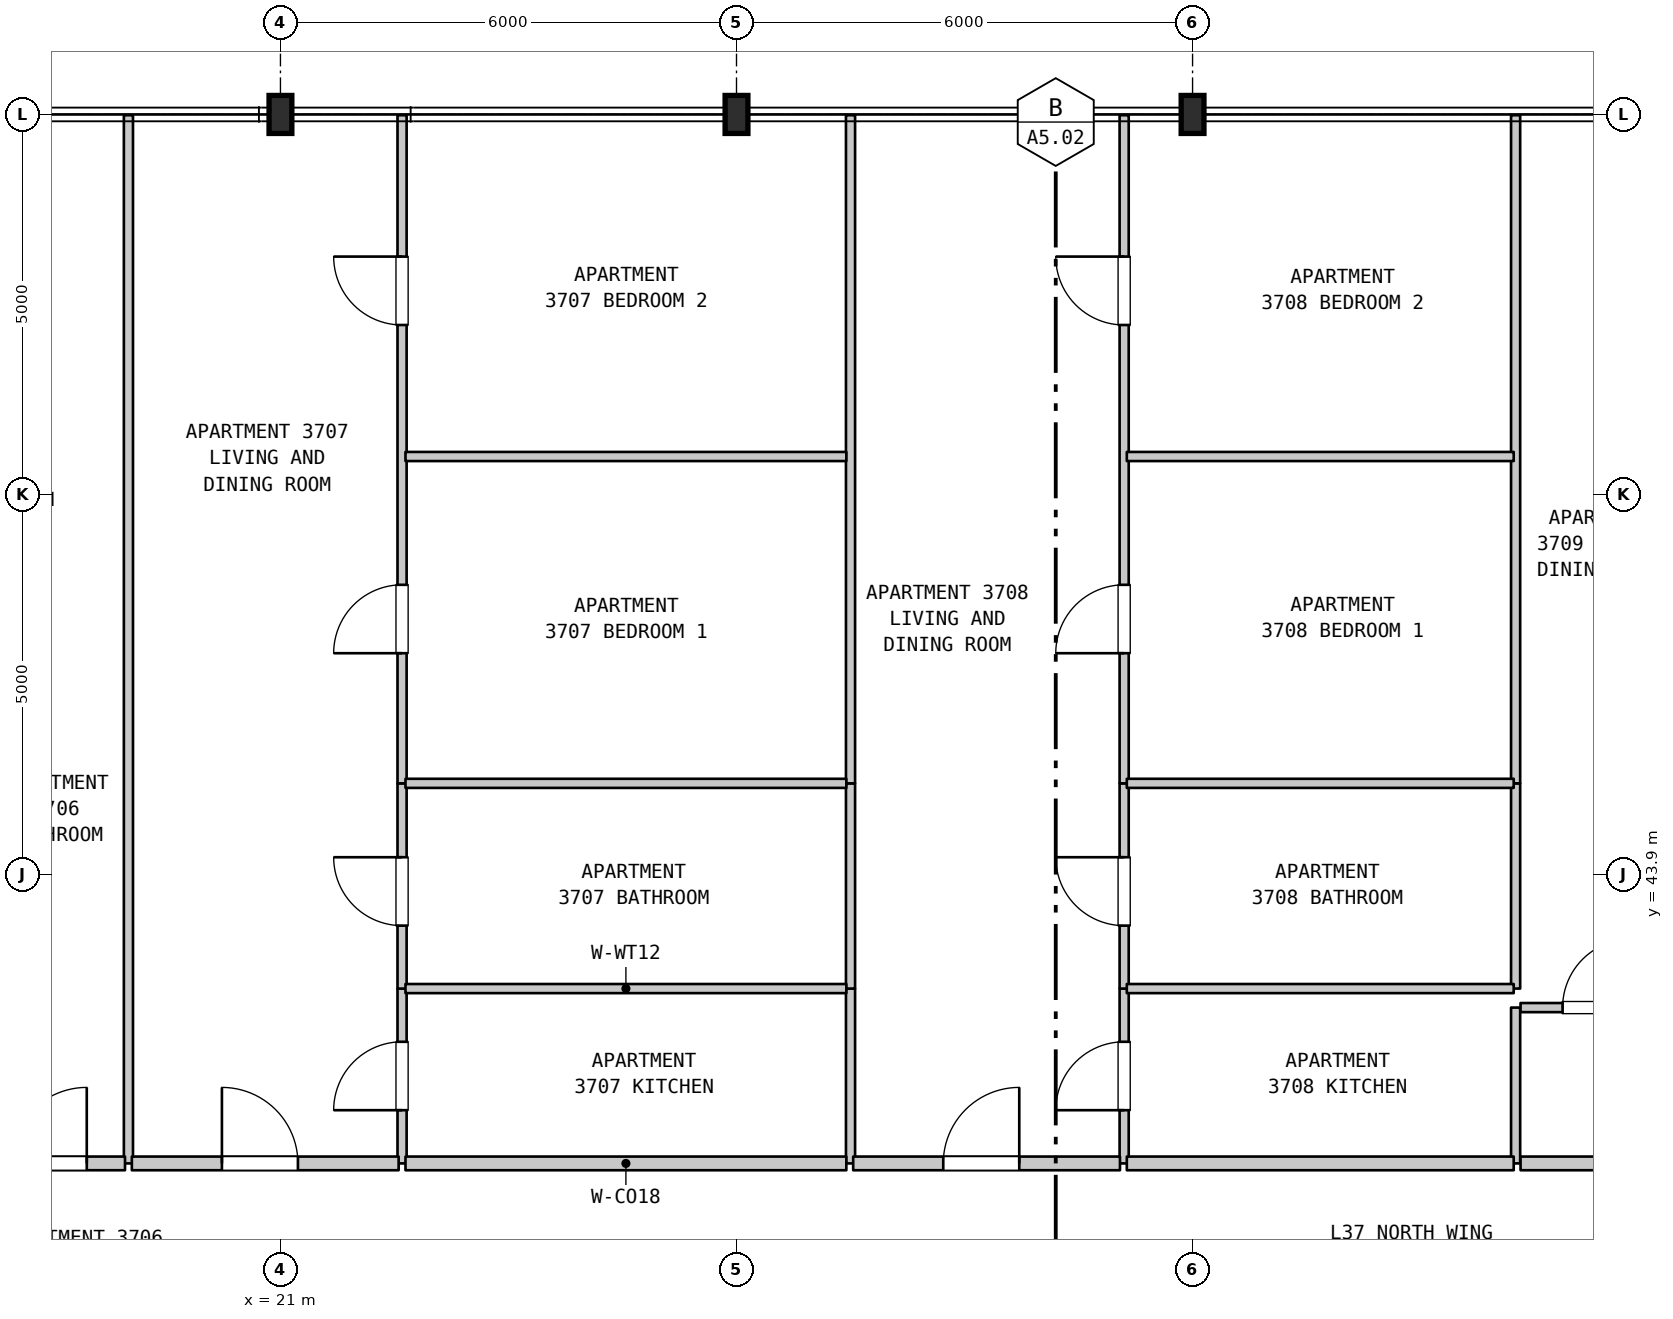
"""IFC4 building model, lengths in metres.
Left out: names, types, materials, properties, quantities, classifications, styles, units other than length and angle.
Written with IfcOpenShell. Run it as: python <this file> out.ifc"""

import sys

from ifc_helpers import new_model, si_unit, direction, frame, frame_2d, origin, origin_2d, place, context, subcontext, project, spatial, rectangle, i_section, extrude, element, fill, save


model = new_model("IFC4")
c1 = context("Model", 3, precision=1e-05, world=origin(), true_north=direction((0.0, 1.0)))
c2 = subcontext(c1, "Body", "Model", "MODEL_VIEW")
j1 = project(units=[si_unit("LENGTHUNIT", "METRE"), si_unit("PLANEANGLEUNIT", "RADIAN")], contexts=[c1])
p1 = place(None, origin())
s1 = spatial("IfcSite", under=j1, at=p1, CompositionType="ELEMENT")
p2 = place(p1, origin())
s2 = spatial("IfcBuilding", under=s1, at=p2, CompositionType="ELEMENT")
p3 = place(p2, frame((0.0, 0.0, 152.0)))
s3 = spatial("IfcBuildingStorey", under=s2, at=p3, CompositionType="ELEMENT", Elevation=152.0)
for number, where, z_axis, x_axis in (
    (1, (21.0, 53.9, 0.0), (0.0, 0.0, 1.0), (1.0, 0.0, 0.0)),
    (2, (27.0, 53.9, 0.0), (0.0, 0.0, 1.0), (1.0, 0.0, 0.0)),
    (3, (33.0, 53.9, 0.0), (0.0, 0.0, 1.0), (1.0, 0.0, 0.0)),
):
    element("IfcColumn", number, at=place(p3, frame(where, z_axis=z_axis, x_axis=x_axis)), inside=s3, PredefinedType="COLUMN", context=c2, shape_type="SweptSolid", body=[
        extrude(i_section(OverallWidth=0.3, OverallDepth=0.5, WebThickness=0.014, FlangeThickness=0.028, FilletRadius=0.027, at=origin_2d()), origin(), (0.0, 0.0, 1.0), 3.7),
    ])
p4 = place(p3, frame((19.0, 40.1, 0.0), z_axis=(0.0, 0.0, 1.0), x_axis=(0.0, 1.0, 0.0)))
e4 = element("IfcWall", 4, at=p4, inside=s3, PredefinedType="PARTITIONING", context=c2, shape_type="SweptSolid", body=[
    extrude(rectangle(XDim=13.79, YDim=0.12, at=frame_2d((6.895, 0.0))), origin(), (0.0, 0.0, 1.0), 3.385),
])
p5 = place(p3, frame((22.6, 40.1, 0.0), z_axis=(0.0, 0.0, 1.0), x_axis=(0.0, 1.0, 0.0)))
e5 = element("IfcWall", 5, at=p5, inside=s3, PredefinedType="PARTITIONING", context=c2, shape_type="SweptSolid", body=[
    extrude(rectangle(XDim=2.3, YDim=0.12, at=frame_2d((1.15, 0.0))), origin(), (0.0, 0.0, 1.0), 3.385),
])
p6 = place(p5, frame((0.7, 0.0, 0.0)))
e6 = element("IfcOpeningElement", 6, at=p6, cuts=e5, PredefinedType="OPENING", context=c2, shape_type="SweptSolid", body=[
    extrude(rectangle(XDim=0.9, YDim=2.15, at=frame_2d((0.45, 1.075))), frame((0.0, 0.07, 0.0), z_axis=(0.0, -1.0, 0.0), x_axis=(1.0, 0.0, 0.0)), (0.0, 0.0, 1.0), 0.14),
])
p7 = place(p3, frame((22.6, 42.4, 0.0), z_axis=(0.0, 0.0, 1.0), x_axis=(0.0, 1.0, 0.0)))
e7 = element("IfcWall", 7, at=p7, inside=s3, PredefinedType="PARTITIONING", context=c2, shape_type="SweptSolid", body=[
    extrude(rectangle(XDim=2.7, YDim=0.12, at=frame_2d((1.35, 0.0))), origin(), (0.0, 0.0, 1.0), 3.385),
])
p8 = place(p7, frame((0.828, 0.0, 0.0)))
e8 = element("IfcOpeningElement", 8, at=p8, cuts=e7, PredefinedType="OPENING", context=c2, shape_type="SweptSolid", body=[
    extrude(rectangle(XDim=0.9, YDim=2.1, at=frame_2d((0.45, 1.05))), frame((0.0, 0.07, 0.0), z_axis=(0.0, -1.0, 0.0), x_axis=(1.0, 0.0, 0.0)), (0.0, 0.0, 1.0), 0.14),
])
p9 = place(p3, frame((22.6, 45.1, 0.0), z_axis=(0.0, 0.0, 1.0), x_axis=(0.0, 1.0, 0.0)))
e9 = element("IfcWall", 9, at=p9, inside=s3, PredefinedType="PARTITIONING", context=c2, shape_type="SweptSolid", body=[
    extrude(rectangle(XDim=8.79, YDim=0.12, at=frame_2d((4.395, 0.0))), origin(), (0.0, 0.0, 1.0), 3.385),
])
p10 = place(p9, frame((1.712, 0.0, 0.0)))
e10 = element("IfcOpeningElement", 10, at=p10, cuts=e9, PredefinedType="OPENING", context=c2, shape_type="SweptSolid", body=[
    extrude(rectangle(XDim=0.9, YDim=2.15, at=frame_2d((0.45, 1.075))), frame((0.0, 0.07, 0.0), z_axis=(0.0, -1.0, 0.0), x_axis=(1.0, 0.0, 0.0)), (0.0, 0.0, 1.0), 0.14),
])
p11 = place(p9, frame((6.03, 0.0, 0.0)))
e11 = element("IfcOpeningElement", 11, at=p11, cuts=e9, PredefinedType="OPENING", context=c2, shape_type="SweptSolid", body=[
    extrude(rectangle(XDim=0.9, YDim=2.15, at=frame_2d((0.45, 1.075))), frame((0.0, 0.07, 0.0), z_axis=(0.0, -1.0, 0.0), x_axis=(1.0, 0.0, 0.0)), (0.0, 0.0, 1.0), 0.14),
])
p12 = place(p3, frame((28.5, 40.1, 0.0), z_axis=(0.0, 0.0, 1.0), x_axis=(0.0, 1.0, 0.0)))
e12 = element("IfcWall", 12, at=p12, inside=s3, PredefinedType="PARTITIONING", context=c2, shape_type="SweptSolid", body=[
    extrude(rectangle(XDim=2.3, YDim=0.12, at=frame_2d((1.15, 0.0))), origin(), (0.0, 0.0, 1.0), 3.385),
])
p13 = place(p3, frame((28.5, 42.4, 0.0), z_axis=(0.0, 0.0, 1.0), x_axis=(0.0, 1.0, 0.0)))
e13 = element("IfcWall", 13, at=p13, inside=s3, PredefinedType="PARTITIONING", context=c2, shape_type="SweptSolid", body=[
    extrude(rectangle(XDim=2.7, YDim=0.12, at=frame_2d((1.35, 0.0))), origin(), (0.0, 0.0, 1.0), 3.385),
])
p14 = place(p3, frame((28.5, 45.1, 0.0), z_axis=(0.0, 0.0, 1.0), x_axis=(0.0, 1.0, 0.0)))
e14 = element("IfcWall", 14, at=p14, inside=s3, PredefinedType="PARTITIONING", context=c2, shape_type="SweptSolid", body=[
    extrude(rectangle(XDim=8.79, YDim=0.12, at=frame_2d((4.395, 0.0))), origin(), (0.0, 0.0, 1.0), 3.385),
])
p15 = place(p3, frame((32.1, 40.1, 0.0), z_axis=(0.0, 0.0, 1.0), x_axis=(0.0, 1.0, 0.0)))
e15 = element("IfcWall", 15, at=p15, inside=s3, PredefinedType="PARTITIONING", context=c2, shape_type="SweptSolid", body=[
    extrude(rectangle(XDim=2.3, YDim=0.12, at=frame_2d((1.15, 0.0))), origin(), (0.0, 0.0, 1.0), 3.385),
])
p16 = place(p15, frame((0.7, 0.0, 0.0)))
e16 = element("IfcOpeningElement", 16, at=p16, cuts=e15, PredefinedType="OPENING", context=c2, shape_type="SweptSolid", body=[
    extrude(rectangle(XDim=0.9, YDim=2.15, at=frame_2d((0.45, 1.075))), frame((0.0, 0.07, 0.0), z_axis=(0.0, -1.0, 0.0), x_axis=(1.0, 0.0, 0.0)), (0.0, 0.0, 1.0), 0.14),
])
p17 = place(p3, frame((32.1, 42.4, 0.0), z_axis=(0.0, 0.0, 1.0), x_axis=(0.0, 1.0, 0.0)))
e17 = element("IfcWall", 17, at=p17, inside=s3, PredefinedType="PARTITIONING", context=c2, shape_type="SweptSolid", body=[
    extrude(rectangle(XDim=2.7, YDim=0.12, at=frame_2d((1.35, 0.0))), origin(), (0.0, 0.0, 1.0), 3.385),
])
p18 = place(p17, frame((0.828, 0.0, 0.0)))
e18 = element("IfcOpeningElement", 18, at=p18, cuts=e17, PredefinedType="OPENING", context=c2, shape_type="SweptSolid", body=[
    extrude(rectangle(XDim=0.9, YDim=2.1, at=frame_2d((0.45, 1.05))), frame((0.0, 0.07, 0.0), z_axis=(0.0, -1.0, 0.0), x_axis=(1.0, 0.0, 0.0)), (0.0, 0.0, 1.0), 0.14),
])
p19 = place(p3, frame((32.1, 45.1, 0.0), z_axis=(0.0, 0.0, 1.0), x_axis=(0.0, 1.0, 0.0)))
e19 = element("IfcWall", 19, at=p19, inside=s3, PredefinedType="PARTITIONING", context=c2, shape_type="SweptSolid", body=[
    extrude(rectangle(XDim=8.79, YDim=0.12, at=frame_2d((4.395, 0.0))), origin(), (0.0, 0.0, 1.0), 3.385),
])
p20 = place(p19, frame((1.712, 0.0, 0.0)))
e20 = element("IfcOpeningElement", 20, at=p20, cuts=e19, PredefinedType="OPENING", context=c2, shape_type="SweptSolid", body=[
    extrude(rectangle(XDim=0.9, YDim=2.15, at=frame_2d((0.45, 1.075))), frame((0.0, 0.07, 0.0), z_axis=(0.0, -1.0, 0.0), x_axis=(1.0, 0.0, 0.0)), (0.0, 0.0, 1.0), 0.14),
])
p21 = place(p19, frame((6.03, 0.0, 0.0)))
e21 = element("IfcOpeningElement", 21, at=p21, cuts=e19, PredefinedType="OPENING", context=c2, shape_type="SweptSolid", body=[
    extrude(rectangle(XDim=0.9, YDim=2.15, at=frame_2d((0.45, 1.075))), frame((0.0, 0.07, 0.0), z_axis=(0.0, -1.0, 0.0), x_axis=(1.0, 0.0, 0.0)), (0.0, 0.0, 1.0), 0.14),
])
p22 = place(p3, frame((37.25, 40.1, 0.0), z_axis=(0.0, 0.0, 1.0), x_axis=(0.0, 1.0, 0.0)))
e22 = element("IfcWall", 22, at=p22, inside=s3, PredefinedType="PARTITIONING", context=c2, shape_type="SweptSolid", body=[
    extrude(rectangle(XDim=2.05, YDim=0.12, at=frame_2d((1.025, 0.0))), origin(), (0.0, 0.0, 1.0), 3.385),
])
p23 = place(p3, frame((37.25, 42.4, 0.0), z_axis=(0.0, 0.0, 1.0), x_axis=(0.0, 1.0, 0.0)))
e23 = element("IfcWall", 23, at=p23, inside=s3, PredefinedType="PARTITIONING", context=c2, shape_type="SweptSolid", body=[
    extrude(rectangle(XDim=2.7, YDim=0.12, at=frame_2d((1.35, 0.0))), origin(), (0.0, 0.0, 1.0), 3.385),
])
p24 = place(p3, frame((37.25, 45.1, 0.0), z_axis=(0.0, 0.0, 1.0), x_axis=(0.0, 1.0, 0.0)))
e24 = element("IfcWall", 24, at=p24, inside=s3, PredefinedType="PARTITIONING", context=c2, shape_type="SweptSolid", body=[
    extrude(rectangle(XDim=8.79, YDim=0.12, at=frame_2d((4.395, 0.0))), origin(), (0.0, 0.0, 1.0), 3.385),
])
p25 = place(p3, frame((17.095, 40.1, 0.0), z_axis=(0.0, 0.0, 1.0), x_axis=(1.0, 0.0, 0.0)))
e25 = element("IfcWall", 25, at=p25, inside=s3, PredefinedType="STANDARD", context=c2, shape_type="SweptSolid", body=[
    extrude(rectangle(XDim=1.86, YDim=0.18, at=frame_2d((0.93, 0.0))), origin(), (0.0, 0.0, 1.0), 3.385),
])
p26 = place(p25, frame((0.357, 0.0, 0.0)))
e26 = element("IfcOpeningElement", 26, at=p26, cuts=e25, PredefinedType="OPENING", context=c2, shape_type="SweptSolid", body=[
    extrude(rectangle(XDim=1.0, YDim=2.15, at=frame_2d((0.5, 1.075))), frame((0.0, 0.1, 0.0), z_axis=(0.0, -1.0, 0.0), x_axis=(1.0, 0.0, 0.0)), (0.0, 0.0, 1.0), 0.2),
])
p27 = place(p3, frame((19.045, 40.1, 0.0), z_axis=(0.0, 0.0, 1.0), x_axis=(1.0, 0.0, 0.0)))
e27 = element("IfcWall", 27, at=p27, inside=s3, PredefinedType="STANDARD", context=c2, shape_type="SweptSolid", body=[
    extrude(rectangle(XDim=3.51, YDim=0.18, at=frame_2d((1.755, 0.0))), origin(), (0.0, 0.0, 1.0), 3.385),
])
p28 = place(p27, frame((1.185, 0.0, 0.0)))
e28 = element("IfcOpeningElement", 28, at=p28, cuts=e27, PredefinedType="OPENING", context=c2, shape_type="SweptSolid", body=[
    extrude(rectangle(XDim=1.0, YDim=2.15, at=frame_2d((0.5, 1.075))), frame((0.0, 0.1, 0.0), z_axis=(0.0, -1.0, 0.0), x_axis=(1.0, 0.0, 0.0)), (0.0, 0.0, 1.0), 0.2),
])
p29 = place(p3, frame((22.645, 40.1, 0.0), z_axis=(0.0, 0.0, 1.0), x_axis=(1.0, 0.0, 0.0)))
e29 = element("IfcWall", 29, at=p29, inside=s3, PredefinedType="STANDARD", context=c2, shape_type="SweptSolid", body=[
    extrude(rectangle(XDim=5.8, YDim=0.18, at=frame_2d((2.9, 0.0))), origin(), (0.0, 0.0, 1.0), 3.385),
])
p30 = place(p3, frame((28.535, 40.1, 0.0), z_axis=(0.0, 0.0, 1.0), x_axis=(1.0, 0.0, 0.0)))
e30 = element("IfcWall", 30, at=p30, inside=s3, PredefinedType="STANDARD", context=c2, shape_type="SweptSolid", body=[
    extrude(rectangle(XDim=3.51, YDim=0.18, at=frame_2d((1.755, 0.0))), origin(), (0.0, 0.0, 1.0), 3.385),
])
p31 = place(p30, frame((1.185, 0.0, 0.0)))
e31 = element("IfcOpeningElement", 31, at=p31, cuts=e30, PredefinedType="OPENING", context=c2, shape_type="SweptSolid", body=[
    extrude(rectangle(XDim=1.0, YDim=2.15, at=frame_2d((0.5, 1.075))), frame((0.0, 0.1, 0.0), z_axis=(0.0, -1.0, 0.0), x_axis=(1.0, 0.0, 0.0)), (0.0, 0.0, 1.0), 0.2),
])
p32 = place(p3, frame((32.135, 40.1, 0.0), z_axis=(0.0, 0.0, 1.0), x_axis=(1.0, 0.0, 0.0)))
e32 = element("IfcWall", 32, at=p32, inside=s3, PredefinedType="STANDARD", context=c2, shape_type="SweptSolid", body=[
    extrude(rectangle(XDim=5.09, YDim=0.18, at=frame_2d((2.545, 0.0))), origin(), (0.0, 0.0, 1.0), 3.385),
])
p33 = place(p3, frame((37.315, 40.1, 0.0), z_axis=(0.0, 0.0, 1.0), x_axis=(1.0, 0.0, 0.0)))
e33 = element("IfcWall", 33, at=p33, inside=s3, PredefinedType="STANDARD", context=c2, shape_type="SweptSolid", body=[
    extrude(rectangle(XDim=5.095, YDim=0.18, at=frame_2d((2.547, 0.0))), origin(), (0.0, 0.0, 1.0), 3.385),
])
p34 = place(p33, frame((1.807, 0.0, 0.0)))
e34 = element("IfcOpeningElement", 34, at=p34, cuts=e33, PredefinedType="OPENING", context=c2, shape_type="SweptSolid", body=[
    extrude(rectangle(XDim=1.0, YDim=2.15, at=frame_2d((0.5, 1.075))), frame((0.0, 0.1, 0.0), z_axis=(0.0, -1.0, 0.0), x_axis=(1.0, 0.0, 0.0)), (0.0, 0.0, 1.0), 0.2),
])
p35 = place(p3, frame((37.315, 42.15, 0.0), z_axis=(0.0, 0.0, 1.0), x_axis=(1.0, 0.0, 0.0)))
e35 = element("IfcWall", 35, at=p35, inside=s3, PredefinedType="PARTITIONING", context=c2, shape_type="SweptSolid", body=[
    extrude(rectangle(XDim=2.16, YDim=0.12, at=frame_2d((1.08, 0.0))), origin(), (0.0, 0.0, 1.0), 3.385),
])
p36 = place(p35, frame((0.553, 0.0, 0.0)))
e36 = element("IfcOpeningElement", 36, at=p36, cuts=e35, PredefinedType="OPENING", context=c2, shape_type="SweptSolid", body=[
    extrude(rectangle(XDim=0.9, YDim=2.15, at=frame_2d((0.45, 1.075))), frame((0.0, 0.07, 0.0), z_axis=(0.0, -1.0, 0.0), x_axis=(1.0, 0.0, 0.0)), (0.0, 0.0, 1.0), 0.14),
])
p37 = place(p3, frame((22.645, 42.4, 0.0), z_axis=(0.0, 0.0, 1.0), x_axis=(1.0, 0.0, 0.0)))
e37 = element("IfcWall", 37, at=p37, inside=s3, PredefinedType="PARTITIONING", context=c2, shape_type="SweptSolid", body=[
    extrude(rectangle(XDim=5.8, YDim=0.12, at=frame_2d((2.9, 0.0))), origin(), (0.0, 0.0, 1.0), 3.385),
])
p38 = place(p3, frame((32.135, 42.4, 0.0), z_axis=(0.0, 0.0, 1.0), x_axis=(1.0, 0.0, 0.0)))
e38 = element("IfcWall", 38, at=p38, inside=s3, PredefinedType="PARTITIONING", context=c2, shape_type="SweptSolid", body=[
    extrude(rectangle(XDim=5.09, YDim=0.12, at=frame_2d((2.545, 0.0))), origin(), (0.0, 0.0, 1.0), 3.385),
])
p39 = place(p3, frame((22.645, 45.1, 0.0), z_axis=(0.0, 0.0, 1.0), x_axis=(1.0, 0.0, 0.0)))
e39 = element("IfcWall", 39, at=p39, inside=s3, PredefinedType="PARTITIONING", context=c2, shape_type="SweptSolid", body=[
    extrude(rectangle(XDim=5.8, YDim=0.12, at=frame_2d((2.9, 0.0))), origin(), (0.0, 0.0, 1.0), 3.385),
])
p40 = place(p3, frame((32.135, 45.1, 0.0), z_axis=(0.0, 0.0, 1.0), x_axis=(1.0, 0.0, 0.0)))
e40 = element("IfcWall", 40, at=p40, inside=s3, PredefinedType="PARTITIONING", context=c2, shape_type="SweptSolid", body=[
    extrude(rectangle(XDim=5.09, YDim=0.12, at=frame_2d((2.545, 0.0))), origin(), (0.0, 0.0, 1.0), 3.385),
])
p41 = place(p3, frame((22.645, 49.4, 0.0), z_axis=(0.0, 0.0, 1.0), x_axis=(1.0, 0.0, 0.0)))
e41 = element("IfcWall", 41, at=p41, inside=s3, PredefinedType="PARTITIONING", context=c2, shape_type="SweptSolid", body=[
    extrude(rectangle(XDim=5.8, YDim=0.12, at=frame_2d((2.9, 0.0))), origin(), (0.0, 0.0, 1.0), 3.385),
])
p42 = place(p3, frame((32.135, 49.4, 0.0), z_axis=(0.0, 0.0, 1.0), x_axis=(1.0, 0.0, 0.0)))
e42 = element("IfcWall", 42, at=p42, inside=s3, PredefinedType="PARTITIONING", context=c2, shape_type="SweptSolid", body=[
    extrude(rectangle(XDim=5.09, YDim=0.12, at=frame_2d((2.545, 0.0))), origin(), (0.0, 0.0, 1.0), 3.385),
])
p43 = place(p6, origin())
e43 = element("IfcDoor", 43, at=p43, inside=s3, OperationType="SINGLE_SWING_LEFT", PredefinedType="DOOR", context=c2, shape_type="SweptSolid", body=[
    extrude(rectangle(XDim=0.9, YDim=2.15, at=frame_2d((0.45, 1.075))), frame((0.0, 0.025, 0.0), z_axis=(0.0, -1.0, 0.0), x_axis=(1.0, 0.0, 0.0)), (0.0, 0.0, 1.0), 0.05),
])
fill(e6, e43)
p44 = place(p8, origin())
e44 = element("IfcDoor", 44, at=p44, inside=s3, OperationType="SINGLE_SWING_RIGHT", PredefinedType="DOOR", context=c2, shape_type="SweptSolid", body=[
    extrude(rectangle(XDim=0.9, YDim=2.1, at=frame_2d((0.45, 1.05))), frame((0.0, 0.025, 0.0), z_axis=(0.0, -1.0, 0.0), x_axis=(1.0, 0.0, 0.0)), (0.0, 0.0, 1.0), 0.05),
])
fill(e8, e44)
p45 = place(p10, origin())
e45 = element("IfcDoor", 45, at=p45, inside=s3, OperationType="SINGLE_SWING_LEFT", PredefinedType="DOOR", context=c2, shape_type="SweptSolid", body=[
    extrude(rectangle(XDim=0.9, YDim=2.15, at=frame_2d((0.45, 1.075))), frame((0.0, 0.025, 0.0), z_axis=(0.0, -1.0, 0.0), x_axis=(1.0, 0.0, 0.0)), (0.0, 0.0, 1.0), 0.05),
])
fill(e10, e45)
p46 = place(p11, origin())
e46 = element("IfcDoor", 46, at=p46, inside=s3, OperationType="SINGLE_SWING_RIGHT", PredefinedType="DOOR", context=c2, shape_type="SweptSolid", body=[
    extrude(rectangle(XDim=0.9, YDim=2.15, at=frame_2d((0.45, 1.075))), frame((0.0, 0.025, 0.0), z_axis=(0.0, -1.0, 0.0), x_axis=(1.0, 0.0, 0.0)), (0.0, 0.0, 1.0), 0.05),
])
fill(e11, e46)
p47 = place(p16, origin())
e47 = element("IfcDoor", 47, at=p47, inside=s3, OperationType="SINGLE_SWING_LEFT", PredefinedType="DOOR", context=c2, shape_type="SweptSolid", body=[
    extrude(rectangle(XDim=0.9, YDim=2.15, at=frame_2d((0.45, 1.075))), frame((0.0, 0.025, 0.0), z_axis=(0.0, -1.0, 0.0), x_axis=(1.0, 0.0, 0.0)), (0.0, 0.0, 1.0), 0.05),
])
fill(e16, e47)
p48 = place(p18, origin())
e48 = element("IfcDoor", 48, at=p48, inside=s3, OperationType="SINGLE_SWING_RIGHT", PredefinedType="DOOR", context=c2, shape_type="SweptSolid", body=[
    extrude(rectangle(XDim=0.9, YDim=2.1, at=frame_2d((0.45, 1.05))), frame((0.0, 0.025, 0.0), z_axis=(0.0, -1.0, 0.0), x_axis=(1.0, 0.0, 0.0)), (0.0, 0.0, 1.0), 0.05),
])
fill(e18, e48)
p49 = place(p20, origin())
e49 = element("IfcDoor", 49, at=p49, inside=s3, OperationType="SINGLE_SWING_LEFT", PredefinedType="DOOR", context=c2, shape_type="SweptSolid", body=[
    extrude(rectangle(XDim=0.9, YDim=2.15, at=frame_2d((0.45, 1.075))), frame((0.0, 0.025, 0.0), z_axis=(0.0, -1.0, 0.0), x_axis=(1.0, 0.0, 0.0)), (0.0, 0.0, 1.0), 0.05),
])
fill(e20, e49)
p50 = place(p21, origin())
e50 = element("IfcDoor", 50, at=p50, inside=s3, OperationType="SINGLE_SWING_RIGHT", PredefinedType="DOOR", context=c2, shape_type="SweptSolid", body=[
    extrude(rectangle(XDim=0.9, YDim=2.15, at=frame_2d((0.45, 1.075))), frame((0.0, 0.025, 0.0), z_axis=(0.0, -1.0, 0.0), x_axis=(1.0, 0.0, 0.0)), (0.0, 0.0, 1.0), 0.05),
])
fill(e21, e50)
p51 = place(p26, origin())
e51 = element("IfcDoor", 51, at=p51, inside=s3, OperationType="SINGLE_SWING_RIGHT", PredefinedType="DOOR", context=c2, shape_type="SweptSolid", body=[
    extrude(rectangle(XDim=1.0, YDim=2.15, at=frame_2d((0.5, 1.075))), frame((0.0, 0.025, 0.0), z_axis=(0.0, -1.0, 0.0), x_axis=(1.0, 0.0, 0.0)), (0.0, 0.0, 1.0), 0.05),
])
fill(e26, e51)
p52 = place(p28, origin())
e52 = element("IfcDoor", 52, at=p52, inside=s3, OperationType="SINGLE_SWING_LEFT", PredefinedType="DOOR", context=c2, shape_type="SweptSolid", body=[
    extrude(rectangle(XDim=1.0, YDim=2.15, at=frame_2d((0.5, 1.075))), frame((0.0, 0.025, 0.0), z_axis=(0.0, -1.0, 0.0), x_axis=(1.0, 0.0, 0.0)), (0.0, 0.0, 1.0), 0.05),
])
fill(e28, e52)
p53 = place(p31, origin())
e53 = element("IfcDoor", 53, at=p53, inside=s3, OperationType="SINGLE_SWING_RIGHT", PredefinedType="DOOR", context=c2, shape_type="SweptSolid", body=[
    extrude(rectangle(XDim=1.0, YDim=2.15, at=frame_2d((0.5, 1.075))), frame((0.0, 0.025, 0.0), z_axis=(0.0, -1.0, 0.0), x_axis=(1.0, 0.0, 0.0)), (0.0, 0.0, 1.0), 0.05),
])
fill(e31, e53)
p54 = place(p36, origin())
e54 = element("IfcDoor", 54, at=p54, inside=s3, OperationType="SINGLE_SWING_RIGHT", PredefinedType="DOOR", context=c2, shape_type="SweptSolid", body=[
    extrude(rectangle(XDim=0.9, YDim=2.15, at=frame_2d((0.45, 1.075))), frame((0.0, 0.025, 0.0), z_axis=(0.0, -1.0, 0.0), x_axis=(1.0, 0.0, 0.0)), (0.0, 0.0, 1.0), 0.05),
])
fill(e36, e54)
save(model, sys.argv[1])
